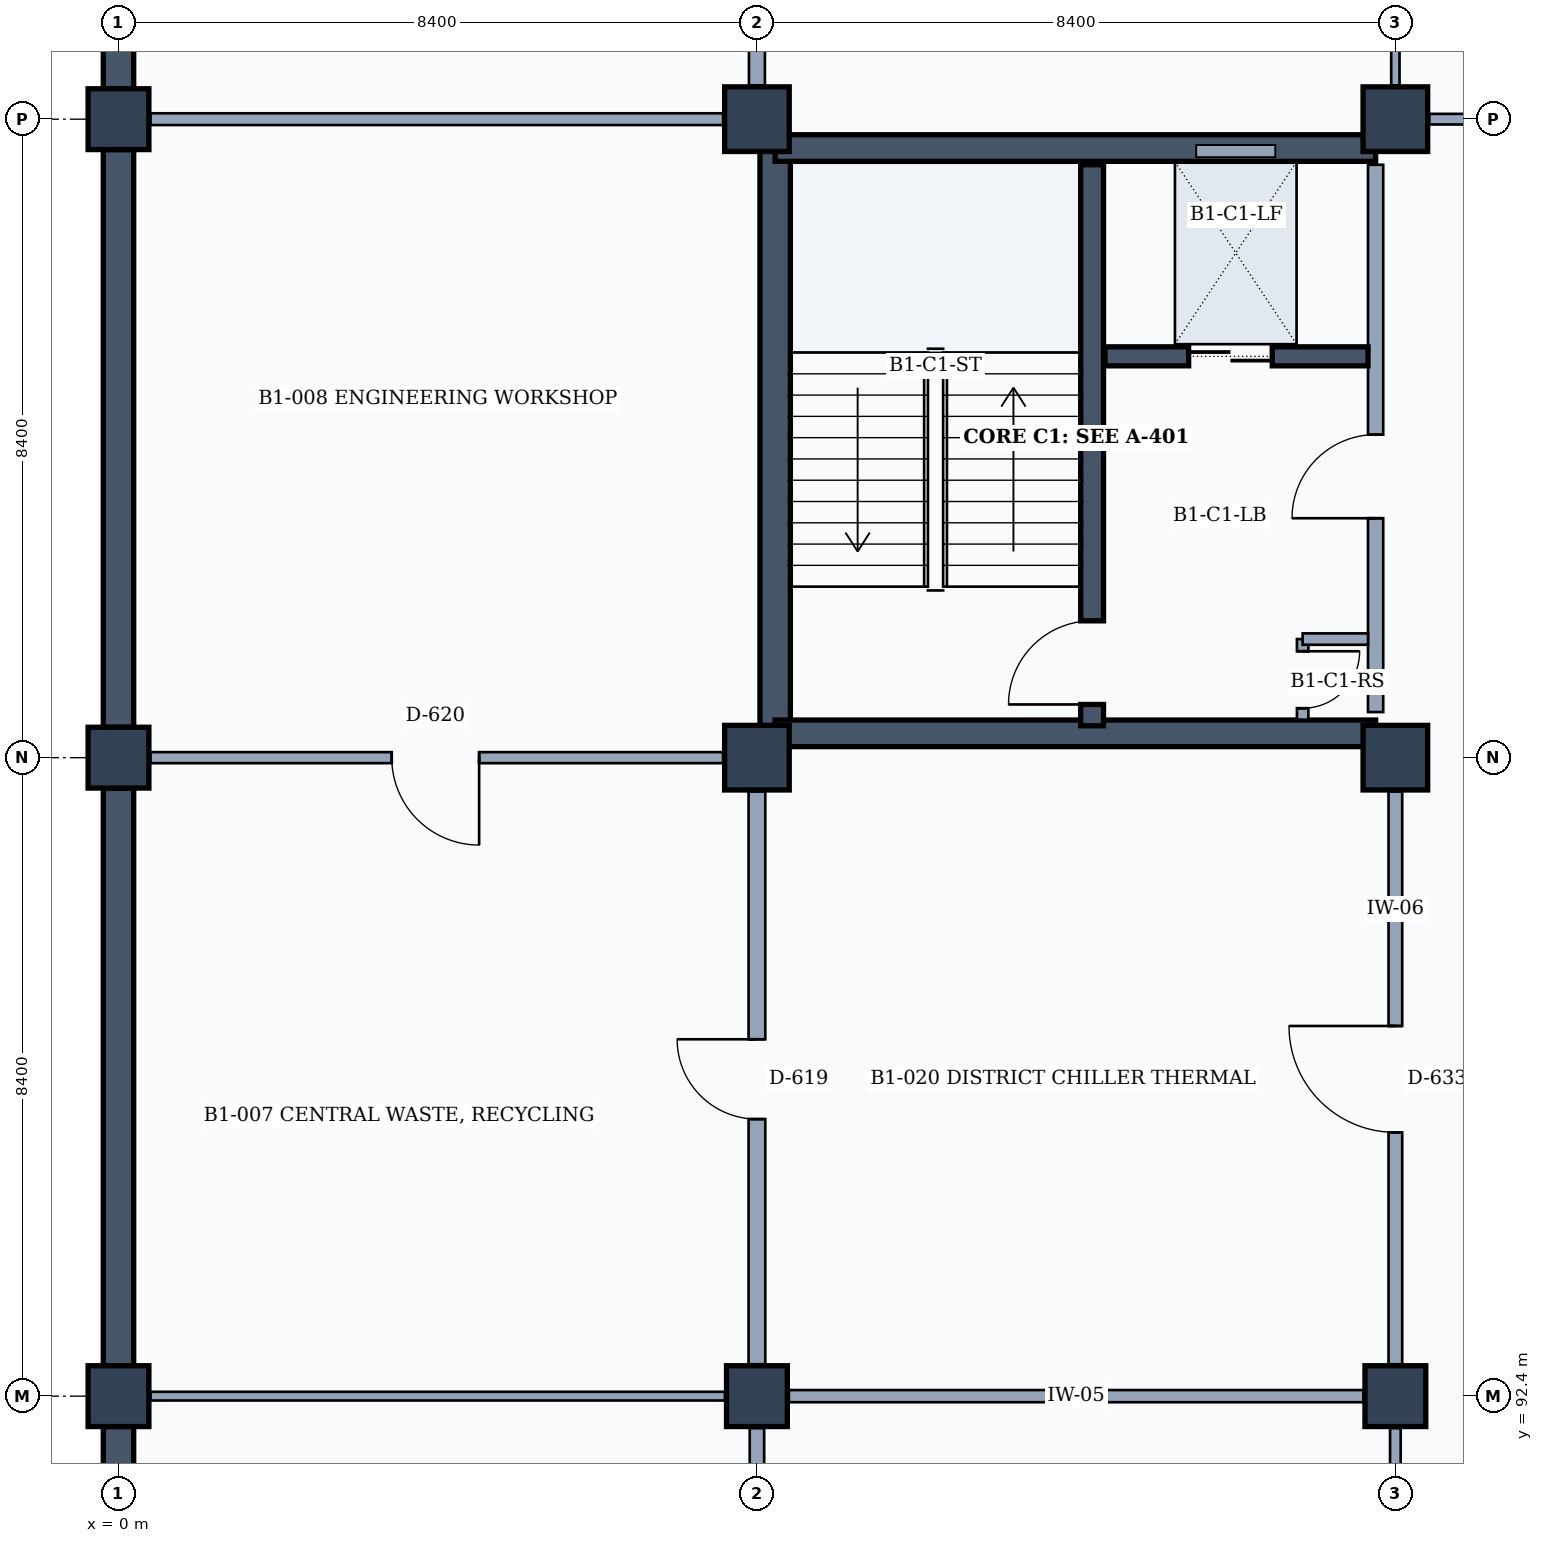
"""IFC4 building model, lengths in metres.
Left out: names, types, materials, properties, quantities, classifications, styles, units other than length and angle.
Written with IfcOpenShell. Run it as: python <this file> out.ifc"""

import sys

from ifc_helpers import new_model, si_unit, direction, frame, frame_2d, origin, origin_2d, place, context, subcontext, project, spatial, rectangle, extrude, element, fill, save


model = new_model("IFC4")
c1 = context("Model", 3, precision=1e-05, world=origin(), true_north=direction((0.0, 1.0)))
c2 = subcontext(c1, "Body", "Model", "MODEL_VIEW")
j1 = project(units=[si_unit("LENGTHUNIT", "METRE"), si_unit("PLANEANGLEUNIT", "RADIAN")], contexts=[c1])
p1 = place(None, origin())
s1 = spatial("IfcSite", under=j1, at=p1, CompositionType="ELEMENT")
p2 = place(p1, origin())
s2 = spatial("IfcBuilding", under=s1, at=p2, CompositionType="ELEMENT")
p3 = place(p2, frame((0.0, 0.0, -4.2)))
s3 = spatial("IfcBuildingStorey", under=s2, at=p3, CompositionType="ELEMENT", Elevation=-4.2)
for number, where, z_axis, x_axis in (
    (1, (0.0, 92.4, 0.0), (0.0, 0.0, 1.0), (1.0, 0.0, 0.0)),
    (2, (0.0, 100.8, 0.0), (0.0, 0.0, 1.0), (1.0, 0.0, 0.0)),
    (3, (0.0, 109.2, 0.0), (0.0, 0.0, 1.0), (1.0, 0.0, 0.0)),
    (4, (8.4, 92.4, 0.0), (0.0, 0.0, 1.0), (1.0, 0.0, 0.0)),
):
    element("IfcColumn", number, at=place(p3, frame(where, z_axis=z_axis, x_axis=x_axis)), inside=s3, PredefinedType="COLUMN", context=c2, shape_type="SweptSolid", body=[
        extrude(rectangle(XDim=0.8, YDim=0.8, at=origin_2d()), origin(), (0.0, 0.0, 1.0), 4.2),
    ])
for number, where, z_axis, x_axis in (
    (5, (8.4, 100.8, 0.0), (0.0, 0.0, 1.0), (1.0, 0.0, 0.0)),
    (6, (8.4, 109.2, 0.0), (0.0, 0.0, 1.0), (1.0, 0.0, 0.0)),
):
    element("IfcColumn", number, at=place(p3, frame(where, z_axis=z_axis, x_axis=x_axis)), inside=s3, PredefinedType="COLUMN", context=c2, shape_type="SweptSolid", body=[
        extrude(rectangle(XDim=0.85, YDim=0.85, at=origin_2d()), origin(), (0.0, 0.0, 1.0), 4.2),
    ])
p4 = place(p3, frame((16.8, 92.4, 0.0), z_axis=(0.0, 0.0, 1.0), x_axis=(1.0, 0.0, 0.0)))
e7 = element("IfcColumn", 7, at=p4, inside=s3, PredefinedType="COLUMN", context=c2, shape_type="SweptSolid", body=[
    extrude(rectangle(XDim=0.8, YDim=0.8, at=origin_2d()), origin(), (0.0, 0.0, 1.0), 4.2),
])
for number, where, z_axis, x_axis in (
    (8, (16.8, 100.8, 0.0), (0.0, 0.0, 1.0), (1.0, 0.0, 0.0)),
    (9, (16.8, 109.2, 0.0), (0.0, 0.0, 1.0), (1.0, 0.0, 0.0)),
):
    element("IfcColumn", number, at=place(p3, frame(where, z_axis=z_axis, x_axis=x_axis)), inside=s3, PredefinedType="COLUMN", context=c2, shape_type="SweptSolid", body=[
        extrude(rectangle(XDim=0.85, YDim=0.85, at=origin_2d()), origin(), (0.0, 0.0, 1.0), 4.2),
    ])
p5 = place(p3, frame((0.0, 84.4, 0.0), z_axis=(0.0, 0.0, 1.0), x_axis=(0.0, 1.0, 0.0)))
e10 = element("IfcWall", 10, at=p5, inside=s3, PredefinedType="STANDARD", context=c2, shape_type="SweptSolid", body=[
    extrude(rectangle(XDim=7.6, YDim=0.4, at=frame_2d((3.8, 0.0))), origin(), (0.0, 0.0, 1.0), 3.88),
])
p6 = place(p3, frame((0.0, 92.8, 0.0), z_axis=(0.0, 0.0, 1.0), x_axis=(0.0, 1.0, 0.0)))
e11 = element("IfcWall", 11, at=p6, inside=s3, PredefinedType="STANDARD", context=c2, shape_type="SweptSolid", body=[
    extrude(rectangle(XDim=7.6, YDim=0.4, at=frame_2d((3.8, 0.0))), origin(), (0.0, 0.0, 1.0), 3.88),
])
p7 = place(p3, frame((0.0, 101.2, 0.0), z_axis=(0.0, 0.0, 1.0), x_axis=(0.0, 1.0, 0.0)))
e12 = element("IfcWall", 12, at=p7, inside=s3, PredefinedType="STANDARD", context=c2, shape_type="SweptSolid", body=[
    extrude(rectangle(XDim=7.6, YDim=0.4, at=frame_2d((3.8, 0.0))), origin(), (0.0, 0.0, 1.0), 3.88),
])
p8 = place(p3, frame((0.0, 109.6, 0.0), z_axis=(0.0, 0.0, 1.0), x_axis=(0.0, 1.0, 0.0)))
e13 = element("IfcWall", 13, at=p8, inside=s3, PredefinedType="STANDARD", context=c2, shape_type="SweptSolid", body=[
    extrude(rectangle(XDim=7.6, YDim=0.4, at=frame_2d((3.8, 0.0))), origin(), (0.0, 0.0, 1.0), 3.88),
])
p9 = place(p3, frame((8.64, 101.05, 0.0), z_axis=(0.0, 0.0, 1.0), x_axis=(0.0, 1.0, 0.0)))
e14 = element("IfcWall", 14, at=p9, inside=s3, PredefinedType="SHEAR", context=c2, shape_type="SweptSolid", body=[
    extrude(rectangle(XDim=7.94, YDim=0.4, at=frame_2d((3.97, 0.0))), origin(), (0.0, 0.0, 1.0), 3.9),
])
p10 = place(p3, frame((8.64, 108.82, 0.0), z_axis=(0.0, 0.0, 1.0), x_axis=(1.0, 0.0, 0.0)))
e15 = element("IfcWall", 15, at=p10, inside=s3, PredefinedType="SHEAR", context=c2, shape_type="SweptSolid", body=[
    extrude(rectangle(XDim=7.9, YDim=0.35, at=frame_2d((3.95, 0.0))), origin(), (0.0, 0.0, 1.0), 3.9),
])
p11 = place(p3, frame((16.54, 108.6, 0.0), z_axis=(0.0, 0.0, 1.0), x_axis=(0.0, -1.0, 0.0)))
e16 = element("IfcWall", 16, at=p11, inside=s3, PredefinedType="PARTITIONING", context=c2, shape_type="SweptSolid", body=[
    extrude(rectangle(XDim=7.2, YDim=0.2, at=frame_2d((3.6, 0.0))), origin(), (0.0, 0.0, 1.0), 3.25),
])
p12 = place(p11, frame((3.55, 0.0, 0.0)))
e17 = element("IfcOpeningElement", 17, at=p12, cuts=e16, PredefinedType="OPENING", context=c2, shape_type="SweptSolid", body=[
    extrude(rectangle(XDim=1.1, YDim=2.15, at=frame_2d((0.55, 1.075))), frame((0.0, 0.11, 0.0), z_axis=(0.0, -1.0, 0.0), x_axis=(1.0, 0.0, 0.0)), (0.0, 0.0, 1.0), 0.22),
])
p13 = place(p3, frame((16.54, 101.12, 0.0), z_axis=(0.0, 0.0, 1.0), x_axis=(-1.0, 0.0, 0.0)))
e18 = element("IfcWall", 18, at=p13, inside=s3, PredefinedType="SHEAR", context=c2, shape_type="SweptSolid", body=[
    extrude(rectangle(XDim=7.9, YDim=0.35, at=frame_2d((3.95, 0.0))), origin(), (0.0, 0.0, 1.0), 3.9),
])
p14 = place(p3, frame((12.81, 101.22, 0.0), z_axis=(0.0, 0.0, 1.0), x_axis=(0.0, 1.0, 0.0)))
e19 = element("IfcWall", 19, at=p14, inside=s3, PredefinedType="SHEAR", context=c2, shape_type="SweptSolid", body=[
    extrude(rectangle(XDim=7.38, YDim=0.3, at=frame_2d((3.69, 0.0))), origin(), (0.0, 0.0, 1.0), 3.9),
])
p15 = place(p14, frame((0.28, 0.0, 0.0)))
e20 = element("IfcOpeningElement", 20, at=p15, cuts=e19, PredefinedType="OPENING", context=c2, shape_type="SweptSolid", body=[
    extrude(rectangle(XDim=1.1, YDim=2.15, at=frame_2d((0.55, 1.075))), frame((0.0, 0.16, 0.0), z_axis=(0.0, -1.0, 0.0), x_axis=(1.0, 0.0, 0.0)), (0.0, 0.0, 1.0), 0.32),
])
p16 = place(p3, frame((15.58, 102.36, 0.0), z_axis=(0.0, 0.0, 1.0), x_axis=(0.0, -1.0, 0.0)))
e21 = element("IfcWall", 21, at=p16, inside=s3, PredefinedType="PARTITIONING", context=c2, shape_type="SweptSolid", body=[
    extrude(rectangle(XDim=1.06, YDim=0.15, at=frame_2d((0.53, 0.0))), origin(), (0.0, 0.0, 1.0), 3.32),
])
p17 = place(p16, frame((0.16, 0.0, 0.0)))
e22 = element("IfcOpeningElement", 22, at=p17, cuts=e21, PredefinedType="OPENING", context=c2, shape_type="SweptSolid", body=[
    extrude(rectangle(XDim=0.75, YDim=2.05, at=frame_2d((0.375, 1.025))), frame((0.0, 0.085, 0.0), z_axis=(0.0, -1.0, 0.0), x_axis=(1.0, 0.0, 0.0)), (0.0, 0.0, 1.0), 0.17),
])
p18 = place(p3, frame((15.58, 102.36, 0.0), z_axis=(0.0, 0.0, 1.0), x_axis=(1.0, 0.0, 0.0)))
e23 = element("IfcWall", 23, at=p18, inside=s3, PredefinedType="PARTITIONING", context=c2, shape_type="SweptSolid", body=[
    extrude(rectangle(XDim=0.86, YDim=0.15, at=frame_2d((0.43, 0.0))), origin(), (0.0, 0.0, 1.0), 3.32),
])
p19 = place(p3, frame((12.98, 106.08, 0.0), z_axis=(0.0, 0.0, 1.0), x_axis=(1.0, 0.0, 0.0)))
e24 = element("IfcWall", 24, at=p19, inside=s3, PredefinedType="SHEAR", context=c2, shape_type="SweptSolid", body=[
    extrude(rectangle(XDim=3.46, YDim=0.25, at=frame_2d((1.73, 0.0))), origin(), (0.0, 0.0, 1.0), 3.9),
])
p20 = place(p19, frame((1.1, 0.0, 0.0)))
e25 = element("IfcOpeningElement", 25, at=p20, cuts=e24, PredefinedType="OPENING", context=c2, shape_type="SweptSolid", body=[
    extrude(rectangle(XDim=1.1, YDim=2.15, at=frame_2d((0.55, 1.075))), frame((0.0, 0.135, 0.0), z_axis=(0.0, -1.0, 0.0), x_axis=(1.0, 0.0, 0.0)), (0.0, 0.0, 1.0), 0.27),
])
p21 = place(p3, frame((8.4, 84.42, 0.0), z_axis=(0.0, 0.0, 1.0), x_axis=(0.0, 1.0, 0.0)))
e26 = element("IfcWall", 26, at=p21, inside=s3, PredefinedType="PARTITIONING", context=c2, shape_type="SweptSolid", body=[
    extrude(rectangle(XDim=7.56, YDim=0.19, at=frame_2d((3.78, 0.0))), origin(), (0.0, 0.0, 1.0), 3.25),
])
p22 = place(p21, frame((2.925, 0.0, 0.0)))
e27 = element("IfcOpeningElement", 27, at=p22, cuts=e26, PredefinedType="OPENING", context=c2, shape_type="SweptSolid", body=[
    extrude(rectangle(XDim=1.65, YDim=2.25, at=frame_2d((0.825, 1.125))), frame((0.0, 0.105, 0.0), z_axis=(0.0, -1.0, 0.0), x_axis=(1.0, 0.0, 0.0)), (0.0, 0.0, 1.0), 0.21),
])
p23 = place(p3, frame((0.42, 92.4, 0.0), z_axis=(0.0, 0.0, 1.0), x_axis=(1.0, 0.0, 0.0)))
e28 = element("IfcWall", 28, at=p23, inside=s3, PredefinedType="PARTITIONING", context=c2, shape_type="SweptSolid", body=[
    extrude(rectangle(XDim=7.56, YDim=0.115, at=frame_2d((3.78, 0.0))), origin(), (0.0, 0.0, 1.0), 3.05),
])
p24 = place(p3, frame((8.4, 92.82, 0.0), z_axis=(0.0, 0.0, 1.0), x_axis=(0.0, 1.0, 0.0)))
e29 = element("IfcWall", 29, at=p24, inside=s3, PredefinedType="PARTITIONING", context=c2, shape_type="SweptSolid", body=[
    extrude(rectangle(XDim=7.535, YDim=0.22, at=frame_2d((3.768, 0.0))), origin(), (0.0, 0.0, 1.0), 3.25),
])
p25 = place(p24, frame((3.225, 0.0, 0.0)))
e30 = element("IfcOpeningElement", 30, at=p25, cuts=e29, PredefinedType="OPENING", context=c2, shape_type="SweptSolid", body=[
    extrude(rectangle(XDim=1.05, YDim=2.2, at=frame_2d((0.525, 1.1))), frame((0.0, 0.12, 0.0), z_axis=(0.0, -1.0, 0.0), x_axis=(1.0, 0.0, 0.0)), (0.0, 0.0, 1.0), 0.24),
])
p26 = place(p3, frame((0.42, 100.8, 0.0), z_axis=(0.0, 0.0, 1.0), x_axis=(1.0, 0.0, 0.0)))
e31 = element("IfcWall", 31, at=p26, inside=s3, PredefinedType="PARTITIONING", context=c2, shape_type="SweptSolid", body=[
    extrude(rectangle(XDim=7.535, YDim=0.145, at=frame_2d((3.768, 0.0))), origin(), (0.0, 0.0, 1.0), 3.05),
])
p27 = place(p26, frame((3.175, 0.0, 0.0)))
e32 = element("IfcOpeningElement", 32, at=p27, cuts=e31, PredefinedType="OPENING", context=c2, shape_type="SweptSolid", body=[
    extrude(rectangle(XDim=1.15, YDim=2.25, at=frame_2d((0.575, 1.125))), frame((0.0, 0.083, 0.0), z_axis=(0.0, -1.0, 0.0), x_axis=(1.0, 0.0, 0.0)), (0.0, 0.0, 1.0), 0.165),
])
p28 = place(p3, frame((0.42, 109.2, 0.0), z_axis=(0.0, 0.0, 1.0), x_axis=(1.0, 0.0, 0.0)))
e33 = element("IfcWall", 33, at=p28, inside=s3, PredefinedType="PARTITIONING", context=c2, shape_type="SweptSolid", body=[
    extrude(rectangle(XDim=7.535, YDim=0.155, at=frame_2d((3.768, 0.0))), origin(), (0.0, 0.0, 1.0), 3.05),
])
p29 = place(p3, frame((8.4, 109.645, 0.0), z_axis=(0.0, 0.0, 1.0), x_axis=(0.0, 1.0, 0.0)))
e34 = element("IfcWall", 34, at=p29, inside=s3, PredefinedType="PARTITIONING", context=c2, shape_type="SweptSolid", body=[
    extrude(rectangle(XDim=7.535, YDim=0.21, at=frame_2d((3.768, 0.0))), origin(), (0.0, 0.0, 1.0), 3.25),
])
p30 = place(p29, frame((3.1, 0.0, 0.0)))
e35 = element("IfcOpeningElement", 35, at=p30, cuts=e34, PredefinedType="OPENING", context=c2, shape_type="SweptSolid", body=[
    extrude(rectangle(XDim=1.3, YDim=2.2, at=frame_2d((0.65, 1.1))), frame((0.0, 0.115, 0.0), z_axis=(0.0, -1.0, 0.0), x_axis=(1.0, 0.0, 0.0)), (0.0, 0.0, 1.0), 0.23),
])
p31 = place(p3, frame((16.8, 84.42, 0.0), z_axis=(0.0, 0.0, 1.0), x_axis=(0.0, 1.0, 0.0)))
e36 = element("IfcWall", 36, at=p31, inside=s3, PredefinedType="PARTITIONING", context=c2, shape_type="SweptSolid", body=[
    extrude(rectangle(XDim=7.56, YDim=0.14, at=frame_2d((3.78, 0.0))), origin(), (0.0, 0.0, 1.0), 3.25),
])
p32 = place(p31, frame((3.15, 0.0, 0.0)))
e37 = element("IfcOpeningElement", 37, at=p32, cuts=e36, PredefinedType="OPENING", context=c2, shape_type="SweptSolid", body=[
    extrude(rectangle(XDim=1.2, YDim=2.2, at=frame_2d((0.6, 1.1))), frame((0.0, 0.08, 0.0), z_axis=(0.0, -1.0, 0.0), x_axis=(1.0, 0.0, 0.0)), (0.0, 0.0, 1.0), 0.16),
])
p33 = place(p3, frame((8.82, 92.4, 0.0), z_axis=(0.0, 0.0, 1.0), x_axis=(1.0, 0.0, 0.0)))
e38 = element("IfcWall", 38, at=p33, inside=s3, PredefinedType="PARTITIONING", context=c2, shape_type="SweptSolid", body=[
    extrude(rectangle(XDim=7.56, YDim=0.16, at=frame_2d((3.78, 0.0))), origin(), (0.0, 0.0, 1.0), 3.05),
])
p34 = place(p3, frame((16.8, 92.82, 0.0), z_axis=(0.0, 0.0, 1.0), x_axis=(0.0, 1.0, 0.0)))
e39 = element("IfcWall", 39, at=p34, inside=s3, PredefinedType="PARTITIONING", context=c2, shape_type="SweptSolid", body=[
    extrude(rectangle(XDim=7.535, YDim=0.18, at=frame_2d((3.768, 0.0))), origin(), (0.0, 0.0, 1.0), 3.25),
])
p35 = place(p34, frame((3.05, 0.0, 0.0)))
e40 = element("IfcOpeningElement", 40, at=p35, cuts=e39, PredefinedType="OPENING", context=c2, shape_type="SweptSolid", body=[
    extrude(rectangle(XDim=1.4, YDim=2.25, at=frame_2d((0.7, 1.125))), frame((0.0, 0.1, 0.0), z_axis=(0.0, -1.0, 0.0), x_axis=(1.0, 0.0, 0.0)), (0.0, 0.0, 1.0), 0.2),
])
p36 = place(p3, frame((16.8, 109.645, 0.0), z_axis=(0.0, 0.0, 1.0), x_axis=(0.0, 1.0, 0.0)))
e41 = element("IfcWall", 41, at=p36, inside=s3, PredefinedType="PARTITIONING", context=c2, shape_type="SweptSolid", body=[
    extrude(rectangle(XDim=7.535, YDim=0.11, at=frame_2d((3.768, 0.0))), origin(), (0.0, 0.0, 1.0), 3.25),
])
p37 = place(p36, frame((3.0, 0.0, 0.0)))
e42 = element("IfcOpeningElement", 42, at=p37, cuts=e41, PredefinedType="OPENING", context=c2, shape_type="SweptSolid", body=[
    extrude(rectangle(XDim=1.5, YDim=2.3, at=frame_2d((0.75, 1.15))), frame((0.0, 0.065, 0.0), z_axis=(0.0, -1.0, 0.0), x_axis=(1.0, 0.0, 0.0)), (0.0, 0.0, 1.0), 0.13),
])
p38 = place(p3, frame((17.245, 109.2, 0.0), z_axis=(0.0, 0.0, 1.0), x_axis=(1.0, 0.0, 0.0)))
e43 = element("IfcWall", 43, at=p38, inside=s3, PredefinedType="PARTITIONING", context=c2, shape_type="SweptSolid", body=[
    extrude(rectangle(XDim=7.535, YDim=0.14, at=frame_2d((3.768, 0.0))), origin(), (0.0, 0.0, 1.0), 3.05),
])
p39 = place(p38, frame((3.025, 0.0, 0.0)))
e44 = element("IfcOpeningElement", 44, at=p39, cuts=e43, PredefinedType="OPENING", context=c2, shape_type="SweptSolid", body=[
    extrude(rectangle(XDim=1.45, YDim=2.35, at=frame_2d((0.725, 1.175))), frame((0.0, 0.08, 0.0), z_axis=(0.0, -1.0, 0.0), x_axis=(1.0, 0.0, 0.0)), (0.0, 0.0, 1.0), 0.16),
])
p40 = place(p12, frame((1.1, 0.0, 0.0), z_axis=(0.0, 0.0, 1.0), x_axis=(-1.0, 0.0, 0.0)))
e45 = element("IfcDoor", 45, at=p40, inside=s3, OperationType="SINGLE_SWING_LEFT", PredefinedType="DOOR", context=c2, shape_type="SweptSolid", body=[
    extrude(rectangle(XDim=1.1, YDim=2.15, at=frame_2d((0.55, 1.075))), frame((0.0, 0.025, 0.0), z_axis=(0.0, -1.0, 0.0), x_axis=(1.0, 0.0, 0.0)), (0.0, 0.0, 1.0), 0.05),
])
fill(e17, e45)
p41 = place(p15, origin())
e46 = element("IfcDoor", 46, at=p41, inside=s3, OperationType="SINGLE_SWING_LEFT", PredefinedType="DOOR", context=c2, shape_type="SweptSolid", body=[
    extrude(rectangle(XDim=1.1, YDim=2.15, at=frame_2d((0.55, 1.075))), frame((0.0, 0.025, 0.0), z_axis=(0.0, -1.0, 0.0), x_axis=(1.0, 0.0, 0.0)), (0.0, 0.0, 1.0), 0.05),
])
fill(e20, e46)
p42 = place(p17, origin())
e47 = element("IfcDoor", 47, at=p42, inside=s3, OperationType="SINGLE_SWING_LEFT", PredefinedType="TRAPDOOR", context=c2, shape_type="SweptSolid", body=[
    extrude(rectangle(XDim=0.75, YDim=2.05, at=frame_2d((0.375, 1.025))), frame((0.0, 0.025, 0.0), z_axis=(0.0, -1.0, 0.0), x_axis=(1.0, 0.0, 0.0)), (0.0, 0.0, 1.0), 0.05),
])
fill(e22, e47)
p43 = place(p20, origin())
e48 = element("IfcDoor", 48, at=p43, inside=s3, OperationType="DOUBLE_DOOR_SLIDING", PredefinedType="DOOR", context=c2, shape_type="SweptSolid", body=[
    extrude(rectangle(XDim=1.1, YDim=2.15, at=frame_2d((0.55, 1.075))), frame((0.0, 0.025, 0.0), z_axis=(0.0, -1.0, 0.0), x_axis=(1.0, 0.0, 0.0)), (0.0, 0.0, 1.0), 0.05),
])
fill(e25, e48)
p44 = place(p25, origin())
e49 = element("IfcDoor", 49, at=p44, inside=s3, OperationType="SINGLE_SWING_RIGHT", PredefinedType="DOOR", context=c2, shape_type="SweptSolid", body=[
    extrude(rectangle(XDim=1.05, YDim=2.2, at=frame_2d((0.525, 1.1))), frame((0.0, 0.025, 0.0), z_axis=(0.0, -1.0, 0.0), x_axis=(1.0, 0.0, 0.0)), (0.0, 0.0, 1.0), 0.05),
])
fill(e30, e49)
p45 = place(p27, frame((1.15, 0.0, 0.0), z_axis=(0.0, 0.0, 1.0), x_axis=(-1.0, 0.0, 0.0)))
e50 = element("IfcDoor", 50, at=p45, inside=s3, OperationType="SINGLE_SWING_LEFT", PredefinedType="DOOR", context=c2, shape_type="SweptSolid", body=[
    extrude(rectangle(XDim=1.15, YDim=2.25, at=frame_2d((0.575, 1.125))), frame((0.0, 0.025, 0.0), z_axis=(0.0, -1.0, 0.0), x_axis=(1.0, 0.0, 0.0)), (0.0, 0.0, 1.0), 0.05),
])
fill(e32, e50)
p46 = place(p35, origin())
e51 = element("IfcDoor", 51, at=p46, inside=s3, OperationType="SINGLE_SWING_RIGHT", PredefinedType="DOOR", context=c2, shape_type="SweptSolid", body=[
    extrude(rectangle(XDim=1.4, YDim=2.25, at=frame_2d((0.7, 1.125))), frame((0.0, 0.025, 0.0), z_axis=(0.0, -1.0, 0.0), x_axis=(1.0, 0.0, 0.0)), (0.0, 0.0, 1.0), 0.05),
])
fill(e40, e51)
save(model, sys.argv[1])
